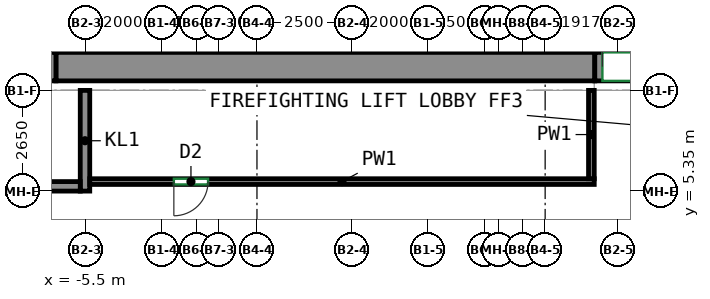
"""IFC4 building model, lengths in metres.
Left out: names, types, materials, properties, quantities, classifications, styles, units other than length and angle.
Written with IfcOpenShell. Run it as: python <this file> out.ifc"""

import sys

from ifc_helpers import new_model, si_unit, direction, frame, frame_2d, origin, place, context, subcontext, project, spatial, rectangle, extrude, source, transform, mapped, element, fill, save


model = new_model("IFC4")
c1 = context("Model", 3, precision=1e-05, world=origin(), true_north=direction((0.0, 1.0)))
c2 = subcontext(c1, "Body", "Model", "MODEL_VIEW")
j1 = project(units=[si_unit("LENGTHUNIT", "METRE"), si_unit("PLANEANGLEUNIT", "RADIAN")], contexts=[c1])
p1 = place(None, origin())
s1 = spatial("IfcSite", under=j1, at=p1, CompositionType="ELEMENT")
p2 = place(p1, origin())
s2 = spatial("IfcBuilding", under=s1, at=p2, CompositionType="ELEMENT")
p3 = place(p2, frame((0.0, 0.0, 188.9)))
s3 = spatial("IfcBuildingStorey", under=s2, at=p3, CompositionType="ELEMENT", Elevation=188.9)
m1 = source(origin(), c2, "Body", "SweptSolid", [
    extrude(rectangle(XDim=14.18, YDim=0.75, at=frame_2d((7.09, 0.0))), origin(), (0.0, 0.0, 1.0), 3.12),
])
p4 = place(p3, frame((-6.29, 8.625, 0.0), z_axis=(0.0, 0.0, 1.0), x_axis=(1.0, 0.0, 0.0)))
e1 = element("IfcWall", 1, at=p4, inside=s3, PredefinedType="SHEAR", context=c2, shape_type="MappedRepresentation", body=[
    mapped(m1, transform((0.0, 0.0, 0.0))),
])
m2 = source(origin(), c2, "Body", "SweptSolid", [
    extrude(rectangle(XDim=2.65, YDim=0.25, at=frame_2d((1.325, 0.0))), origin(), (0.0, 0.0, 1.0), 3.12),
])
p5 = place(p3, frame((-5.525, 5.35, 0.0), z_axis=(0.0, 0.0, 1.0), x_axis=(0.0, 1.0, 0.0)))
e2 = element("IfcWall", 2, at=p5, inside=s3, PredefinedType="PARTITIONING", context=c2, shape_type="MappedRepresentation", body=[
    mapped(m2, transform((0.0, 0.0, 0.0))),
])
m3 = source(origin(), c2, "Body", "SweptSolid", [
    extrude(rectangle(XDim=5.36, YDim=0.25, at=frame_2d((2.68, 0.0))), origin(), (0.0, 0.0, 1.0), 3.12),
])
p6 = place(p3, frame((-11.01, 5.475, 0.0), z_axis=(0.0, 0.0, 1.0), x_axis=(1.0, 0.0, 0.0)))
e3 = element("IfcWall", 3, at=p6, inside=s3, PredefinedType="PARTITIONING", context=c2, shape_type="MappedRepresentation", body=[
    mapped(m3, transform((0.0, 0.0, 0.0))),
])
p7 = place(p6, frame((2.28, 0.0, 0.0)))
e4 = element("IfcOpeningElement", 4, at=p7, cuts=e3, PredefinedType="OPENING", context=c2, shape_type="SweptSolid", body=[
    extrude(rectangle(XDim=0.8, YDim=2.0, at=frame_2d((0.4, 1.0))), frame((0.0, 0.135, 0.0), z_axis=(0.0, -1.0, 0.0), x_axis=(1.0, 0.0, 0.0)), (0.0, 0.0, 1.0), 0.27),
])
m4 = source(origin(), c2, "Body", "SweptSolid", [
    extrude(rectangle(XDim=1.4, YDim=0.75, at=frame_2d((0.7, 0.0))), origin(), (0.0, 0.0, 1.0), 2.7),
])
p8 = place(p3, frame((-7.69, 8.625, 0.0), z_axis=(0.0, 0.0, 1.0), x_axis=(1.0, 0.0, 0.0)))
e5 = element("IfcWall", 5, at=p8, inside=s3, PredefinedType="PARTITIONING", context=c2, shape_type="MappedRepresentation", body=[
    mapped(m4, transform((0.0, 0.0, 0.0))),
])
p9 = place(p8, frame((0.25, 0.0, 0.0)))
e6 = element("IfcOpeningElement", 6, at=p9, cuts=e5, PredefinedType="OPENING", context=c2, shape_type="SweptSolid", body=[
    extrude(rectangle(XDim=0.9, YDim=2.1, at=frame_2d((0.45, 1.05))), frame((0.0, 0.385, 0.0), z_axis=(0.0, -1.0, 0.0), x_axis=(1.0, 0.0, 0.0)), (0.0, 0.0, 1.0), 0.77),
])
m5 = source(origin(), c2, "Body", "SweptSolid", [
    extrude(rectangle(XDim=2.4, YDim=0.75, at=frame_2d((1.2, 0.0))), origin(), (0.0, 0.0, 1.0), 2.7),
])
p10 = place(p3, frame((7.89, 8.625, 0.0), z_axis=(0.0, 0.0, 1.0), x_axis=(1.0, 0.0, 0.0)))
e7 = element("IfcWall", 7, at=p10, inside=s3, PredefinedType="PARTITIONING", context=c2, shape_type="MappedRepresentation", body=[
    mapped(m5, transform((0.0, 0.0, 0.0))),
])
p11 = place(p10, frame((0.2, 0.0, 0.0)))
e8 = element("IfcOpeningElement", 8, at=p11, cuts=e7, PredefinedType="OPENING", context=c2, shape_type="SweptSolid", body=[
    extrude(rectangle(XDim=2.0, YDim=2.1, at=frame_2d((1.0, 1.05))), frame((0.0, 0.385, 0.0), z_axis=(0.0, -1.0, 0.0), x_axis=(1.0, 0.0, 0.0)), (0.0, 0.0, 1.0), 0.77),
])
p12 = place(p3, frame((7.875, 5.6, 0.0), z_axis=(0.0, 0.0, 1.0), x_axis=(-1.0, 0.0, 0.0)))
e9 = element("IfcWall", 9, at=p12, inside=s3, PredefinedType="PARTITIONING", context=c2, shape_type="SweptSolid", body=[
    extrude(rectangle(XDim=13.275, YDim=0.15, at=frame_2d((6.637, 0.0))), origin(), (0.0, 0.0, 1.0), 3.12),
])
p13 = place(p12, frame((10.162, 0.0, 0.0)))
e10 = element("IfcOpeningElement", 10, at=p13, cuts=e9, PredefinedType="OPENING", context=c2, shape_type="SweptSolid", body=[
    extrude(rectangle(XDim=0.9, YDim=2.1, at=frame_2d((0.45, 1.05))), frame((0.0, 0.085, 0.0), z_axis=(0.0, -1.0, 0.0), x_axis=(1.0, 0.0, 0.0)), (0.0, 0.0, 1.0), 0.17),
])
p14 = place(p3, frame((7.8, 8.0, 0.0), z_axis=(0.0, 0.0, 1.0), x_axis=(0.0, -1.0, 0.0)))
e11 = element("IfcWall", 11, at=p14, inside=s3, PredefinedType="PARTITIONING", context=c2, shape_type="SweptSolid", body=[
    extrude(rectangle(XDim=2.325, YDim=0.15, at=frame_2d((1.163, 0.0))), origin(), (0.0, 0.0, 1.0), 3.12),
])
p15 = place(p11, origin())
e12 = element("IfcDoor", 12, at=p15, inside=s3, OperationType="DOUBLE_DOOR_SINGLE_SWING", PredefinedType="DOOR", context=c2, shape_type="SweptSolid", body=[
    extrude(rectangle(XDim=2.0, YDim=2.1, at=frame_2d((1.0, 1.05))), frame((0.0, 0.28, 0.0), z_axis=(0.0, -1.0, 0.0), x_axis=(1.0, 0.0, 0.0)), (0.0, 0.0, 1.0), 0.05),
])
fill(e8, e12)
p16 = place(p13, origin())
e13 = element("IfcDoor", 13, at=p16, inside=s3, OperationType="SINGLE_SWING_RIGHT", PredefinedType="DOOR", context=c2, shape_type="SweptSolid", body=[
    extrude(rectangle(XDim=0.9, YDim=2.1, at=frame_2d((0.45, 1.05))), frame((0.0, 0.025, 0.0), z_axis=(0.0, -1.0, 0.0), x_axis=(1.0, 0.0, 0.0)), (0.0, 0.0, 1.0), 0.05),
])
fill(e10, e13)
save(model, sys.argv[1])
